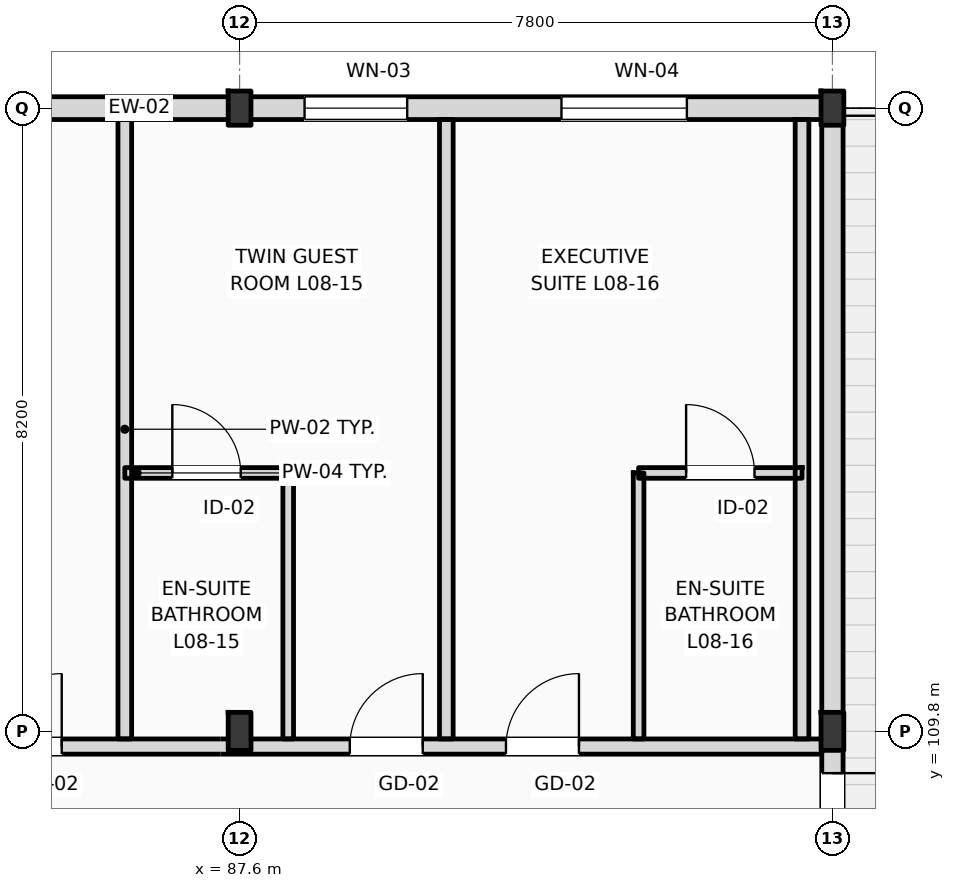
"""IFC4 building model, lengths in metres.
Left out: names, types, materials, properties, quantities, classifications, styles, units other than length and angle.
Written with IfcOpenShell. Run it as: python <this file> out.ifc"""

import sys

from ifc_helpers import new_model, si_unit, direction, frame, frame_2d, origin, origin_2d, place, context, subcontext, project, spatial, rectangle, i_section, extrude, element, fill, save


model = new_model("IFC4")
c1 = context("Model", 3, precision=1e-05, world=origin(), true_north=direction((0.0, 1.0)))
c2 = subcontext(c1, "Body", "Model", "MODEL_VIEW")
j1 = project(units=[si_unit("LENGTHUNIT", "METRE"), si_unit("PLANEANGLEUNIT", "RADIAN")], contexts=[c1])
p1 = place(None, origin())
s1 = spatial("IfcSite", under=j1, at=p1, CompositionType="ELEMENT")
p2 = place(p1, origin())
s2 = spatial("IfcBuilding", under=s1, at=p2, CompositionType="ELEMENT")
p3 = place(p2, frame((0.0, 0.0, 35.4)))
s3 = spatial("IfcBuildingStorey", under=s2, at=p3, CompositionType="ELEMENT", Elevation=35.4)
p4 = place(p3, frame((87.6, 109.8, 0.0), z_axis=(0.0, 0.0, 1.0), x_axis=(1.0, 0.0, 0.0)))
e1 = element("IfcColumn", 1, at=p4, inside=s3, PredefinedType="COLUMN", context=c2, shape_type="SweptSolid", body=[
    extrude(i_section(OverallWidth=0.3, OverallDepth=0.5, WebThickness=0.014, FlangeThickness=0.028, FilletRadius=0.027, at=origin_2d()), origin(), (0.0, 0.0, 1.0), 3.6),
])
p5 = place(p3, frame((87.6, 118.0, 0.0), z_axis=(0.0, 0.0, 1.0), x_axis=(1.0, 0.0, 0.0)))
e2 = element("IfcColumn", 2, at=p5, inside=s3, PredefinedType="COLUMN", context=c2, shape_type="SweptSolid", body=[
    extrude(i_section(OverallWidth=0.3, OverallDepth=0.45, WebThickness=0.014, FlangeThickness=0.026, FilletRadius=0.027, at=origin_2d()), origin(), (0.0, 0.0, 1.0), 3.6),
])
p6 = place(p3, frame((95.4, 109.8, 0.0), z_axis=(0.0, 0.0, 1.0), x_axis=(1.0, 0.0, 0.0)))
e3 = element("IfcColumn", 3, at=p6, inside=s3, PredefinedType="COLUMN", context=c2, shape_type="SweptSolid", body=[
    extrude(i_section(OverallWidth=0.3, OverallDepth=0.5, WebThickness=0.014, FlangeThickness=0.028, FilletRadius=0.027, at=origin_2d()), origin(), (0.0, 0.0, 1.0), 3.6),
])
p7 = place(p3, frame((95.4, 118.0, 0.0), z_axis=(0.0, 0.0, 1.0), x_axis=(1.0, 0.0, 0.0)))
e4 = element("IfcColumn", 4, at=p7, inside=s3, PredefinedType="COLUMN", context=c2, shape_type="SweptSolid", body=[
    extrude(i_section(OverallWidth=0.3, OverallDepth=0.45, WebThickness=0.014, FlangeThickness=0.026, FilletRadius=0.027, at=origin_2d()), origin(), (0.0, 0.0, 1.0), 3.6),
])
p8 = place(p3, frame((22.5, 118.0, 0.0), z_axis=(0.0, 0.0, 1.0), x_axis=(1.0, 0.0, 0.0)))
e5 = element("IfcWall", 5, at=p8, inside=s3, PredefinedType="STANDARD", context=c2, shape_type="SweptSolid", body=[
    extrude(rectangle(XDim=72.9, YDim=0.3, at=frame_2d((36.45, 0.0))), origin(), (0.0, 0.0, 1.0), 2.92),
])
p9 = place(p8, frame((0.91, 0.0, 0.9)))
e6 = element("IfcOpeningElement", 6, at=p9, cuts=e5, PredefinedType="OPENING", context=c2, shape_type="SweptSolid", body=[
    extrude(rectangle(XDim=0.9, YDim=1.84, at=frame_2d((0.45, 0.92))), frame((0.0, 0.16, 0.0), z_axis=(0.0, -1.0, 0.0), x_axis=(1.0, 0.0, 0.0)), (0.0, 0.0, 1.0), 0.32),
])
p10 = place(p8, frame((6.665, 0.0, 0.0)))
e7 = element("IfcOpeningElement", 7, at=p10, cuts=e5, PredefinedType="OPENING", context=c2, shape_type="SweptSolid", body=[
    extrude(rectangle(XDim=1.2, YDim=2.25, at=frame_2d((0.6, 1.125))), frame((0.0, 0.16, 0.0), z_axis=(0.0, -1.0, 0.0), x_axis=(1.0, 0.0, 0.0)), (0.0, 0.0, 1.0), 0.32),
])
p11 = place(p8, frame((11.355, 0.0, 0.9)))
e8 = element("IfcOpeningElement", 8, at=p11, cuts=e5, PredefinedType="OPENING", context=c2, shape_type="SweptSolid", body=[
    extrude(rectangle(XDim=1.1, YDim=1.5, at=frame_2d((0.55, 0.75))), frame((0.0, 0.16, 0.0), z_axis=(0.0, -1.0, 0.0), x_axis=(1.0, 0.0, 0.0)), (0.0, 0.0, 1.0), 0.32),
])
p12 = place(p8, frame((15.58, 0.0, 0.9)))
e9 = element("IfcOpeningElement", 9, at=p12, cuts=e5, PredefinedType="OPENING", context=c2, shape_type="SweptSolid", body=[
    extrude(rectangle(XDim=1.25, YDim=1.6, at=frame_2d((0.625, 0.8))), frame((0.0, 0.16, 0.0), z_axis=(0.0, -1.0, 0.0), x_axis=(1.0, 0.0, 0.0)), (0.0, 0.0, 1.0), 0.32),
])
p13 = place(p8, frame((21.08, 0.0, 0.0)))
e10 = element("IfcOpeningElement", 10, at=p13, cuts=e5, PredefinedType="OPENING", context=c2, shape_type="SweptSolid", body=[
    extrude(rectangle(XDim=1.2, YDim=2.25, at=frame_2d((0.6, 1.125))), frame((0.0, 0.16, 0.0), z_axis=(0.0, -1.0, 0.0), x_axis=(1.0, 0.0, 0.0)), (0.0, 0.0, 1.0), 0.32),
])
p14 = place(p8, frame((23.54, 0.0, 0.0)))
e11 = element("IfcOpeningElement", 11, at=p14, cuts=e5, PredefinedType="OPENING", context=c2, shape_type="SweptSolid", body=[
    extrude(rectangle(XDim=1.2, YDim=2.25, at=frame_2d((0.6, 1.125))), frame((0.0, 0.16, 0.0), z_axis=(0.0, -1.0, 0.0), x_axis=(1.0, 0.0, 0.0)), (0.0, 0.0, 1.0), 0.32),
])
p15 = place(p8, frame((28.83, 0.0, 0.9)))
e12 = element("IfcOpeningElement", 12, at=p15, cuts=e5, PredefinedType="OPENING", context=c2, shape_type="SweptSolid", body=[
    extrude(rectangle(XDim=1.75, YDim=1.84, at=frame_2d((0.875, 0.92))), frame((0.0, 0.16, 0.0), z_axis=(0.0, -1.0, 0.0), x_axis=(1.0, 0.0, 0.0)), (0.0, 0.0, 1.0), 0.32),
])
p16 = place(p8, frame((34.805, 0.0, 0.9)))
e13 = element("IfcOpeningElement", 13, at=p16, cuts=e5, PredefinedType="OPENING", context=c2, shape_type="SweptSolid", body=[
    extrude(rectangle(XDim=1.35, YDim=1.84, at=frame_2d((0.675, 0.92))), frame((0.0, 0.16, 0.0), z_axis=(0.0, -1.0, 0.0), x_axis=(1.0, 0.0, 0.0)), (0.0, 0.0, 1.0), 0.32),
])
p17 = place(p8, frame((38.105, 0.0, 0.0)))
e14 = element("IfcOpeningElement", 14, at=p17, cuts=e5, PredefinedType="OPENING", context=c2, shape_type="SweptSolid", body=[
    extrude(rectangle(XDim=1.2, YDim=2.25, at=frame_2d((0.6, 1.125))), frame((0.0, 0.16, 0.0), z_axis=(0.0, -1.0, 0.0), x_axis=(1.0, 0.0, 0.0)), (0.0, 0.0, 1.0), 0.32),
])
p18 = place(p8, frame((42.505, 0.0, 0.9)))
e15 = element("IfcOpeningElement", 15, at=p18, cuts=e5, PredefinedType="OPENING", context=c2, shape_type="SweptSolid", body=[
    extrude(rectangle(XDim=2.6, YDim=1.84, at=frame_2d((1.3, 0.92))), frame((0.0, 0.16, 0.0), z_axis=(0.0, -1.0, 0.0), x_axis=(1.0, 0.0, 0.0)), (0.0, 0.0, 1.0), 0.32),
])
p19 = place(p8, frame((46.2, 0.0, 0.9)))
e16 = element("IfcOpeningElement", 16, at=p19, cuts=e5, PredefinedType="OPENING", context=c2, shape_type="SweptSolid", body=[
    extrude(rectangle(XDim=1.8, YDim=1.84, at=frame_2d((0.9, 0.92))), frame((0.0, 0.16, 0.0), z_axis=(0.0, -1.0, 0.0), x_axis=(1.0, 0.0, 0.0)), (0.0, 0.0, 1.0), 0.32),
])
p20 = place(p8, frame((52.565, 0.0, 0.0)))
e17 = element("IfcOpeningElement", 17, at=p20, cuts=e5, PredefinedType="OPENING", context=c2, shape_type="SweptSolid", body=[
    extrude(rectangle(XDim=1.2, YDim=2.25, at=frame_2d((0.6, 1.125))), frame((0.0, 0.16, 0.0), z_axis=(0.0, -1.0, 0.0), x_axis=(1.0, 0.0, 0.0)), (0.0, 0.0, 1.0), 0.32),
])
p21 = place(p8, frame((55.305, 0.0, 0.9)))
e18 = element("IfcOpeningElement", 18, at=p21, cuts=e5, PredefinedType="OPENING", context=c2, shape_type="SweptSolid", body=[
    extrude(rectangle(XDim=1.2, YDim=1.8, at=frame_2d((0.6, 0.9))), frame((0.0, 0.16, 0.0), z_axis=(0.0, -1.0, 0.0), x_axis=(1.0, 0.0, 0.0)), (0.0, 0.0, 1.0), 0.32),
])
p22 = place(p8, frame((60.53, 0.0, 0.9)))
e19 = element("IfcOpeningElement", 19, at=p22, cuts=e5, PredefinedType="OPENING", context=c2, shape_type="SweptSolid", body=[
    extrude(rectangle(XDim=1.35, YDim=1.84, at=frame_2d((0.675, 0.92))), frame((0.0, 0.16, 0.0), z_axis=(0.0, -1.0, 0.0), x_axis=(1.0, 0.0, 0.0)), (0.0, 0.0, 1.0), 0.32),
])
p23 = place(p8, frame((65.955, 0.0, 0.9)))
e20 = element("IfcOpeningElement", 20, at=p23, cuts=e5, PredefinedType="OPENING", context=c2, shape_type="SweptSolid", body=[
    extrude(rectangle(XDim=1.35, YDim=1.84, at=frame_2d((0.675, 0.92))), frame((0.0, 0.16, 0.0), z_axis=(0.0, -1.0, 0.0), x_axis=(1.0, 0.0, 0.0)), (0.0, 0.0, 1.0), 0.32),
])
p24 = place(p8, frame((69.335, 0.0, 0.9)))
e21 = element("IfcOpeningElement", 21, at=p24, cuts=e5, PredefinedType="OPENING", context=c2, shape_type="SweptSolid", body=[
    extrude(rectangle(XDim=1.65, YDim=1.84, at=frame_2d((0.825, 0.92))), frame((0.0, 0.16, 0.0), z_axis=(0.0, -1.0, 0.0), x_axis=(1.0, 0.0, 0.0)), (0.0, 0.0, 1.0), 0.32),
])
p25 = place(p3, frame((95.4, 96.0, 0.0), z_axis=(0.0, 0.0, 1.0), x_axis=(0.0, 1.0, 0.0)))
e22 = element("IfcWall", 22, at=p25, inside=s3, PredefinedType="STANDARD", context=c2, shape_type="SweptSolid", body=[
    extrude(rectangle(XDim=22.0, YDim=0.28, at=frame_2d((11.0, 0.0))), origin(), (0.0, 0.0, 1.0), 3.01),
])
p26 = place(p25, frame((11.45, 0.0, 0.0)))
e23 = element("IfcOpeningElement", 23, at=p26, cuts=e22, PredefinedType="OPENING", context=c2, shape_type="SweptSolid", body=[
    extrude(rectangle(XDim=1.8, YDim=2.4, at=frame_2d((0.9, 1.2))), frame((0.0, 0.15, 0.0), z_axis=(0.0, -1.0, 0.0), x_axis=(1.0, 0.0, 0.0)), (0.0, 0.0, 1.0), 0.3),
])
p27 = place(p3, frame((10.65, 109.6, 0.0), z_axis=(0.0, 0.0, 1.0), x_axis=(1.0, 0.0, 0.0)))
e24 = element("IfcWall", 24, at=p27, inside=s3, PredefinedType="PARTITIONING", context=c2, shape_type="SweptSolid", body=[
    extrude(rectangle(XDim=84.61, YDim=0.2, at=frame_2d((42.305, 0.0))), origin(), (0.0, 0.0, 1.0), 2.82),
])
p28 = place(p27, frame((12.675, 0.0, 0.0)))
e25 = element("IfcOpeningElement", 25, at=p28, cuts=e24, PredefinedType="OPENING", context=c2, shape_type="SweptSolid", body=[
    extrude(rectangle(XDim=1.02, YDim=2.2, at=frame_2d((0.51, 1.1))), frame((0.0, 0.11, 0.0), z_axis=(0.0, -1.0, 0.0), x_axis=(1.0, 0.0, 0.0)), (0.0, 0.0, 1.0), 0.22),
])
p29 = place(p27, frame((19.62, 0.0, 0.0)))
e26 = element("IfcOpeningElement", 26, at=p29, cuts=e24, PredefinedType="OPENING", context=c2, shape_type="SweptSolid", body=[
    extrude(rectangle(XDim=1.02, YDim=2.2, at=frame_2d((0.51, 1.1))), frame((0.0, 0.11, 0.0), z_axis=(0.0, -1.0, 0.0), x_axis=(1.0, 0.0, 0.0)), (0.0, 0.0, 1.0), 0.22),
])
p30 = place(p27, frame((24.12, 0.0, 0.0)))
e27 = element("IfcOpeningElement", 27, at=p30, cuts=e24, PredefinedType="OPENING", context=c2, shape_type="SweptSolid", body=[
    extrude(rectangle(XDim=1.02, YDim=2.2, at=frame_2d((0.51, 1.1))), frame((0.0, 0.11, 0.0), z_axis=(0.0, -1.0, 0.0), x_axis=(1.0, 0.0, 0.0)), (0.0, 0.0, 1.0), 0.22),
])
p31 = place(p27, frame((26.47, 0.0, 0.0)))
e28 = element("IfcOpeningElement", 28, at=p31, cuts=e24, PredefinedType="OPENING", context=c2, shape_type="SweptSolid", body=[
    extrude(rectangle(XDim=1.02, YDim=2.2, at=frame_2d((0.51, 1.1))), frame((0.0, 0.11, 0.0), z_axis=(0.0, -1.0, 0.0), x_axis=(1.0, 0.0, 0.0)), (0.0, 0.0, 1.0), 0.22),
])
p32 = place(p27, frame((33.15, 0.0, 0.0)))
e29 = element("IfcOpeningElement", 29, at=p32, cuts=e24, PredefinedType="OPENING", context=c2, shape_type="SweptSolid", body=[
    extrude(rectangle(XDim=0.96, YDim=2.2, at=frame_2d((0.48, 1.1))), frame((0.0, 0.11, 0.0), z_axis=(0.0, -1.0, 0.0), x_axis=(1.0, 0.0, 0.0)), (0.0, 0.0, 1.0), 0.22),
])
p33 = place(p27, frame((35.5, 0.0, 0.0)))
e30 = element("IfcOpeningElement", 30, at=p33, cuts=e24, PredefinedType="OPENING", context=c2, shape_type="SweptSolid", body=[
    extrude(rectangle(XDim=0.96, YDim=2.2, at=frame_2d((0.48, 1.1))), frame((0.0, 0.11, 0.0), z_axis=(0.0, -1.0, 0.0), x_axis=(1.0, 0.0, 0.0)), (0.0, 0.0, 1.0), 0.22),
])
p34 = place(p27, frame((42.15, 0.0, 0.0)))
e31 = element("IfcOpeningElement", 31, at=p34, cuts=e24, PredefinedType="OPENING", context=c2, shape_type="SweptSolid", body=[
    extrude(rectangle(XDim=0.96, YDim=2.2, at=frame_2d((0.48, 1.1))), frame((0.0, 0.11, 0.0), z_axis=(0.0, -1.0, 0.0), x_axis=(1.0, 0.0, 0.0)), (0.0, 0.0, 1.0), 0.22),
])
p35 = place(p27, frame((47.15, 0.0, 0.0)))
e32 = element("IfcOpeningElement", 32, at=p35, cuts=e24, PredefinedType="OPENING", context=c2, shape_type="SweptSolid", body=[
    extrude(rectangle(XDim=0.96, YDim=2.2, at=frame_2d((0.48, 1.1))), frame((0.0, 0.11, 0.0), z_axis=(0.0, -1.0, 0.0), x_axis=(1.0, 0.0, 0.0)), (0.0, 0.0, 1.0), 0.22),
])
p36 = place(p27, frame((51.15, 0.0, 0.0)))
e33 = element("IfcOpeningElement", 33, at=p36, cuts=e24, PredefinedType="OPENING", context=c2, shape_type="SweptSolid", body=[
    extrude(rectangle(XDim=0.96, YDim=2.2, at=frame_2d((0.48, 1.1))), frame((0.0, 0.11, 0.0), z_axis=(0.0, -1.0, 0.0), x_axis=(1.0, 0.0, 0.0)), (0.0, 0.0, 1.0), 0.22),
])
p37 = place(p27, frame((55.65, 0.0, 0.0)))
e34 = element("IfcOpeningElement", 34, at=p37, cuts=e24, PredefinedType="OPENING", context=c2, shape_type="SweptSolid", body=[
    extrude(rectangle(XDim=0.96, YDim=2.2, at=frame_2d((0.48, 1.1))), frame((0.0, 0.11, 0.0), z_axis=(0.0, -1.0, 0.0), x_axis=(1.0, 0.0, 0.0)), (0.0, 0.0, 1.0), 0.22),
])
p38 = place(p27, frame((58.0, 0.0, 0.0)))
e35 = element("IfcOpeningElement", 35, at=p38, cuts=e24, PredefinedType="OPENING", context=c2, shape_type="SweptSolid", body=[
    extrude(rectangle(XDim=0.96, YDim=2.2, at=frame_2d((0.48, 1.1))), frame((0.0, 0.11, 0.0), z_axis=(0.0, -1.0, 0.0), x_axis=(1.0, 0.0, 0.0)), (0.0, 0.0, 1.0), 0.22),
])
p39 = place(p27, frame((64.65, 0.0, 0.0)))
e36 = element("IfcOpeningElement", 36, at=p39, cuts=e24, PredefinedType="OPENING", context=c2, shape_type="SweptSolid", body=[
    extrude(rectangle(XDim=0.96, YDim=2.2, at=frame_2d((0.48, 1.1))), frame((0.0, 0.11, 0.0), z_axis=(0.0, -1.0, 0.0), x_axis=(1.0, 0.0, 0.0)), (0.0, 0.0, 1.0), 0.22),
])
p40 = place(p27, frame((66.75, 0.0, 0.0)))
e37 = element("IfcOpeningElement", 37, at=p40, cuts=e24, PredefinedType="OPENING", context=c2, shape_type="SweptSolid", body=[
    extrude(rectangle(XDim=0.96, YDim=2.2, at=frame_2d((0.48, 1.1))), frame((0.0, 0.11, 0.0), z_axis=(0.0, -1.0, 0.0), x_axis=(1.0, 0.0, 0.0)), (0.0, 0.0, 1.0), 0.22),
])
p41 = place(p27, frame((73.65, 0.0, 0.0)))
e38 = element("IfcOpeningElement", 38, at=p41, cuts=e24, PredefinedType="OPENING", context=c2, shape_type="SweptSolid", body=[
    extrude(rectangle(XDim=0.96, YDim=2.2, at=frame_2d((0.48, 1.1))), frame((0.0, 0.11, 0.0), z_axis=(0.0, -1.0, 0.0), x_axis=(1.0, 0.0, 0.0)), (0.0, 0.0, 1.0), 0.22),
])
p42 = place(p27, frame((78.4, 0.0, 0.0)))
e39 = element("IfcOpeningElement", 39, at=p42, cuts=e24, PredefinedType="OPENING", context=c2, shape_type="SweptSolid", body=[
    extrude(rectangle(XDim=0.96, YDim=2.2, at=frame_2d((0.48, 1.1))), frame((0.0, 0.11, 0.0), z_axis=(0.0, -1.0, 0.0), x_axis=(1.0, 0.0, 0.0)), (0.0, 0.0, 1.0), 0.22),
])
p43 = place(p27, frame((80.455, 0.0, 0.0)))
e40 = element("IfcOpeningElement", 40, at=p43, cuts=e24, PredefinedType="OPENING", context=c2, shape_type="SweptSolid", body=[
    extrude(rectangle(XDim=0.96, YDim=2.2, at=frame_2d((0.48, 1.1))), frame((0.0, 0.11, 0.0), z_axis=(0.0, -1.0, 0.0), x_axis=(1.0, 0.0, 0.0)), (0.0, 0.0, 1.0), 0.22),
])
p44 = place(p27, frame((2.716, 0.0, 0.0)))
e41 = element("IfcOpeningElement", 41, at=p44, cuts=e24, PredefinedType="OPENING", context=c2, shape_type="SweptSolid", body=[
    extrude(rectangle(XDim=1.35, YDim=2.25, at=frame_2d((0.675, 1.125))), frame((0.0, 0.11, 0.0), z_axis=(0.0, -1.0, 0.0), x_axis=(1.0, 0.0, 0.0)), (0.0, 0.0, 1.0), 0.22),
])
p45 = place(p27, frame((6.65, 0.0, 0.0)))
e42 = element("IfcOpeningElement", 42, at=p45, cuts=e24, PredefinedType="OPENING", context=c2, shape_type="SweptSolid", body=[
    extrude(rectangle(XDim=1.35, YDim=2.25, at=frame_2d((0.675, 1.125))), frame((0.0, 0.11, 0.0), z_axis=(0.0, -1.0, 0.0), x_axis=(1.0, 0.0, 0.0)), (0.0, 0.0, 1.0), 0.22),
])
p46 = place(p27, frame((10.583, 0.0, 0.0)))
e43 = element("IfcOpeningElement", 43, at=p46, cuts=e24, PredefinedType="OPENING", context=c2, shape_type="SweptSolid", body=[
    extrude(rectangle(XDim=1.35, YDim=2.25, at=frame_2d((0.675, 1.125))), frame((0.0, 0.11, 0.0), z_axis=(0.0, -1.0, 0.0), x_axis=(1.0, 0.0, 0.0)), (0.0, 0.0, 1.0), 0.22),
])
p47 = place(p3, frame((86.09, 109.7, 0.0), z_axis=(0.0, 0.0, 1.0), x_axis=(0.0, 1.0, 0.0)))
e44 = element("IfcWall", 44, at=p47, inside=s3, PredefinedType="PARTITIONING", context=c2, shape_type="SweptSolid", body=[
    extrude(rectangle(XDim=8.15, YDim=0.18, at=frame_2d((4.075, 0.0))), origin(), (0.0, 0.0, 1.0), 3.38),
])
p48 = place(p3, frame((90.32, 109.7, 0.0), z_axis=(0.0, 0.0, 1.0), x_axis=(0.0, 1.0, 0.0)))
e45 = element("IfcWall", 45, at=p48, inside=s3, PredefinedType="PARTITIONING", context=c2, shape_type="SweptSolid", body=[
    extrude(rectangle(XDim=8.15, YDim=0.18, at=frame_2d((4.075, 0.0))), origin(), (0.0, 0.0, 1.0), 3.07),
])
p49 = place(p3, frame((88.24, 109.7, 0.0), z_axis=(0.0, 0.0, 1.0), x_axis=(0.0, 1.0, 0.0)))
e46 = element("IfcWall", 46, at=p49, inside=s3, PredefinedType="PARTITIONING", context=c2, shape_type="SweptSolid", body=[
    extrude(rectangle(XDim=3.5, YDim=0.14, at=frame_2d((1.75, 0.0))), origin(), (0.0, 0.0, 1.0), 3.38),
])
p50 = place(p3, frame((86.09, 113.2, 0.0), z_axis=(0.0, 0.0, 1.0), x_axis=(1.0, 0.0, 0.0)))
e47 = element("IfcWall", 47, at=p50, inside=s3, PredefinedType="PARTITIONING", context=c2, shape_type="SweptSolid", body=[
    extrude(rectangle(XDim=2.15, YDim=0.14, at=frame_2d((1.075, 0.0))), origin(), (0.0, 0.0, 1.0), 3.38),
])
p51 = place(p50, frame((0.625, 0.0, 0.0)))
e48 = element("IfcOpeningElement", 48, at=p51, cuts=e47, PredefinedType="OPENING", context=c2, shape_type="SweptSolid", body=[
    extrude(rectangle(XDim=0.9, YDim=2.1, at=frame_2d((0.45, 1.05))), frame((0.0, 0.08, 0.0), z_axis=(0.0, -1.0, 0.0), x_axis=(1.0, 0.0, 0.0)), (0.0, 0.0, 1.0), 0.16),
])
p52 = place(p3, frame((95.0, 109.7, 0.0), z_axis=(0.0, 0.0, 1.0), x_axis=(0.0, 1.0, 0.0)))
e49 = element("IfcWall", 49, at=p52, inside=s3, PredefinedType="PARTITIONING", context=c2, shape_type="SweptSolid", body=[
    extrude(rectangle(XDim=8.15, YDim=0.18, at=frame_2d((4.075, 0.0))), origin(), (0.0, 0.0, 1.0), 3.38),
])
p53 = place(p3, frame((92.85, 109.7, 0.0), z_axis=(0.0, 0.0, 1.0), x_axis=(0.0, 1.0, 0.0)))
e50 = element("IfcWall", 50, at=p53, inside=s3, PredefinedType="PARTITIONING", context=c2, shape_type="SweptSolid", body=[
    extrude(rectangle(XDim=3.5, YDim=0.14, at=frame_2d((1.75, 0.0))), origin(), (0.0, 0.0, 1.0), 3.07),
])
p54 = place(p3, frame((92.85, 113.2, 0.0), z_axis=(0.0, 0.0, 1.0), x_axis=(1.0, 0.0, 0.0)))
e51 = element("IfcWall", 51, at=p54, inside=s3, PredefinedType="PARTITIONING", context=c2, shape_type="SweptSolid", body=[
    extrude(rectangle(XDim=2.15, YDim=0.14, at=frame_2d((1.075, 0.0))), origin(), (0.0, 0.0, 1.0), 3.38),
])
p55 = place(p54, frame((0.625, 0.0, 0.0)))
e52 = element("IfcOpeningElement", 52, at=p55, cuts=e51, PredefinedType="OPENING", context=c2, shape_type="SweptSolid", body=[
    extrude(rectangle(XDim=0.9, YDim=2.1, at=frame_2d((0.45, 1.05))), frame((0.0, 0.08, 0.0), z_axis=(0.0, -1.0, 0.0), x_axis=(1.0, 0.0, 0.0)), (0.0, 0.0, 1.0), 0.16),
])
p56 = place(p26, frame((1.8, 0.0, 0.0), z_axis=(0.0, 0.0, 1.0), x_axis=(-1.0, 0.0, 0.0)))
e53 = element("IfcDoor", 53, at=p56, inside=s3, OperationType="DOUBLE_SWING_LEFT", PredefinedType="DOOR", context=c2, shape_type="SweptSolid", body=[
    extrude(rectangle(XDim=1.8, YDim=2.4, at=frame_2d((0.9, 1.2))), frame((0.0, 0.025, 0.0), z_axis=(0.0, -1.0, 0.0), x_axis=(1.0, 0.0, 0.0)), (0.0, 0.0, 1.0), 0.05),
])
fill(e23, e53)
p57 = place(p23, origin())
e54 = element("IfcWindow", 54, at=p57, inside=s3, PartitioningType="DOUBLE_PANEL_VERTICAL", PredefinedType="WINDOW", context=c2, shape_type="SweptSolid", body=[
    extrude(rectangle(XDim=1.35, YDim=1.84, at=frame_2d((0.675, 0.92))), frame((0.0, 0.03, 0.0), z_axis=(0.0, -1.0, 0.0), x_axis=(1.0, 0.0, 0.0)), (0.0, 0.0, 1.0), 0.06),
])
fill(e20, e54)
p58 = place(p24, origin())
e55 = element("IfcWindow", 55, at=p58, inside=s3, PartitioningType="DOUBLE_PANEL_VERTICAL", PredefinedType="WINDOW", context=c2, shape_type="SweptSolid", body=[
    extrude(rectangle(XDim=1.65, YDim=1.84, at=frame_2d((0.825, 0.92))), frame((0.0, 0.03, 0.0), z_axis=(0.0, -1.0, 0.0), x_axis=(1.0, 0.0, 0.0)), (0.0, 0.0, 1.0), 0.06),
])
fill(e21, e55)
p59 = place(p41, origin())
e56 = element("IfcDoor", 56, at=p59, inside=s3, OperationType="SINGLE_SWING_RIGHT", PredefinedType="DOOR", context=c2, shape_type="SweptSolid", body=[
    extrude(rectangle(XDim=0.96, YDim=2.2, at=frame_2d((0.48, 1.1))), frame((0.0, 0.025, 0.0), z_axis=(0.0, -1.0, 0.0), x_axis=(1.0, 0.0, 0.0)), (0.0, 0.0, 1.0), 0.05),
])
fill(e38, e56)
p60 = place(p42, origin())
e57 = element("IfcDoor", 57, at=p60, inside=s3, OperationType="SINGLE_SWING_RIGHT", PredefinedType="DOOR", context=c2, shape_type="SweptSolid", body=[
    extrude(rectangle(XDim=0.96, YDim=2.2, at=frame_2d((0.48, 1.1))), frame((0.0, 0.025, 0.0), z_axis=(0.0, -1.0, 0.0), x_axis=(1.0, 0.0, 0.0)), (0.0, 0.0, 1.0), 0.05),
])
fill(e39, e57)
p61 = place(p51, origin())
e58 = element("IfcDoor", 58, at=p61, inside=s3, OperationType="SINGLE_SWING_LEFT", PredefinedType="DOOR", context=c2, shape_type="SweptSolid", body=[
    extrude(rectangle(XDim=0.9, YDim=2.1, at=frame_2d((0.45, 1.05))), frame((0.0, 0.025, 0.0), z_axis=(0.0, -1.0, 0.0), x_axis=(1.0, 0.0, 0.0)), (0.0, 0.0, 1.0), 0.05),
])
fill(e48, e58)
p62 = place(p43, origin())
e59 = element("IfcDoor", 59, at=p62, inside=s3, OperationType="SINGLE_SWING_RIGHT", PredefinedType="DOOR", context=c2, shape_type="SweptSolid", body=[
    extrude(rectangle(XDim=0.96, YDim=2.2, at=frame_2d((0.48, 1.1))), frame((0.0, 0.025, 0.0), z_axis=(0.0, -1.0, 0.0), x_axis=(1.0, 0.0, 0.0)), (0.0, 0.0, 1.0), 0.05),
])
fill(e40, e59)
p63 = place(p55, origin())
e60 = element("IfcDoor", 60, at=p63, inside=s3, OperationType="SINGLE_SWING_LEFT", PredefinedType="DOOR", context=c2, shape_type="SweptSolid", body=[
    extrude(rectangle(XDim=0.9, YDim=2.1, at=frame_2d((0.45, 1.05))), frame((0.0, 0.025, 0.0), z_axis=(0.0, -1.0, 0.0), x_axis=(1.0, 0.0, 0.0)), (0.0, 0.0, 1.0), 0.05),
])
fill(e52, e60)
save(model, sys.argv[1])
